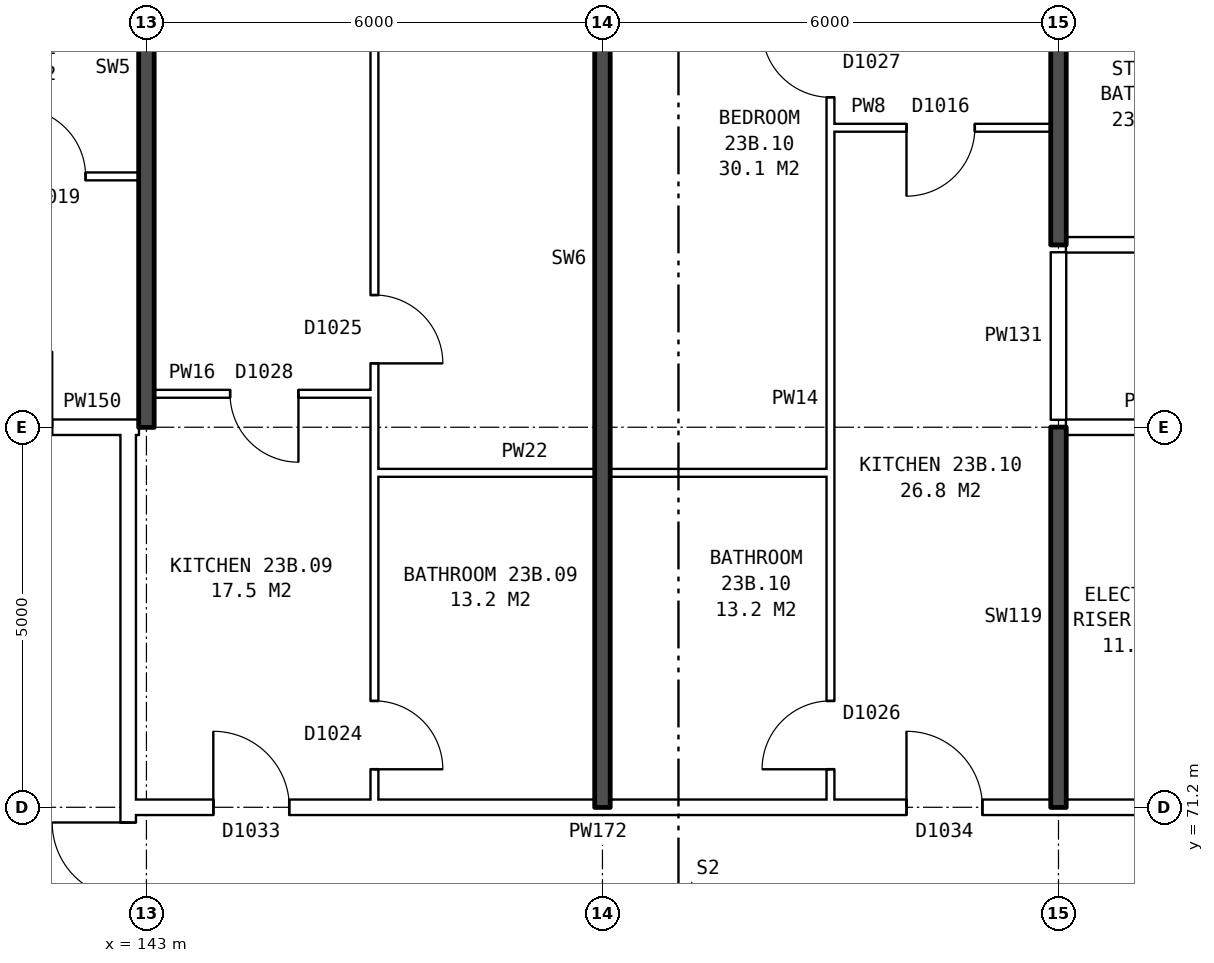
"""IFC4 building model, lengths in metres.
Left out: names, types, materials, properties, quantities, classifications, styles, units other than length and angle.
Written with IfcOpenShell. Run it as: python <this file> out.ifc"""

import sys

from ifc_helpers import new_model, si_unit, direction, frame, frame_2d, origin, place, context, subcontext, project, spatial, rectangle, extrude, element, fill, save


model = new_model("IFC4")
c1 = context("Model", 3, precision=1e-05, world=origin(), true_north=direction((0.0, 1.0)))
c2 = subcontext(c1, "Body", "Model", "MODEL_VIEW")
j1 = project(units=[si_unit("LENGTHUNIT", "METRE"), si_unit("PLANEANGLEUNIT", "RADIAN")], contexts=[c1])
p1 = place(None, origin())
s1 = spatial("IfcSite", under=j1, at=p1, CompositionType="ELEMENT")
p2 = place(p1, origin())
s2 = spatial("IfcBuilding", under=s1, at=p2, CompositionType="ELEMENT")
p3 = place(p2, frame((0.0, 0.0, 84.0)))
s3 = spatial("IfcBuildingStorey", under=s2, at=p3, CompositionType="ELEMENT", Elevation=84.0)
p4 = place(p3, frame((142.76, 63.9, 0.0), z_axis=(0.0, 0.0, 1.0), x_axis=(0.0, 1.0, 0.0)))
e1 = element("IfcWall", 1, at=p4, inside=s3, PredefinedType="PARTITIONING", context=c2, shape_type="SweptSolid", body=[
    extrude(rectangle(XDim=12.2, YDim=0.2, at=frame_2d((6.1, 0.0))), origin(), (0.0, 0.0, 1.0), 2.85),
])
p5 = place(p4, frame((5.1, 0.0, 0.0)))
e2 = element("IfcOpeningElement", 2, at=p5, cuts=e1, PredefinedType="OPENING", context=c2, shape_type="SweptSolid", body=[
    extrude(rectangle(XDim=2.0, YDim=2.1, at=frame_2d((1.0, 1.05))), frame((0.0, 0.11, 0.0), z_axis=(0.0, -1.0, 0.0), x_axis=(1.0, 0.0, 0.0)), (0.0, 0.0, 1.0), 0.22),
])
p6 = place(p3, frame((142.76, 71.2, 0.0), z_axis=(0.0, 0.0, 1.0), x_axis=(1.0, 0.0, 0.0)))
e3 = element("IfcWall", 3, at=p6, inside=s3, PredefinedType="PARTITIONING", context=c2, shape_type="SweptSolid", body=[
    extrude(rectangle(XDim=14.48, YDim=0.2, at=frame_2d((7.24, 0.0))), origin(), (0.0, 0.0, 1.0), 2.85),
])
p7 = place(p6, frame((1.12, 0.0, 0.0)))
e4 = element("IfcOpeningElement", 4, at=p7, cuts=e3, PredefinedType="OPENING", context=c2, shape_type="SweptSolid", body=[
    extrude(rectangle(XDim=1.0, YDim=2.1, at=frame_2d((0.5, 1.05))), frame((0.0, 0.11, 0.0), z_axis=(0.0, -1.0, 0.0), x_axis=(1.0, 0.0, 0.0)), (0.0, 0.0, 1.0), 0.22),
])
p8 = place(p6, frame((10.24, 0.0, 0.0)))
e5 = element("IfcOpeningElement", 5, at=p8, cuts=e3, PredefinedType="OPENING", context=c2, shape_type="SweptSolid", body=[
    extrude(rectangle(XDim=1.0, YDim=2.1, at=frame_2d((0.5, 1.05))), frame((0.0, 0.11, 0.0), z_axis=(0.0, -1.0, 0.0), x_axis=(1.0, 0.0, 0.0)), (0.0, 0.0, 1.0), 0.22),
])
p9 = place(p3, frame((146.0, 75.6, 0.0), z_axis=(0.0, 0.0, 1.0), x_axis=(1.0, 0.0, 0.0)))
e6 = element("IfcWall", 6, at=p9, inside=s3, PredefinedType="PARTITIONING", context=c2, shape_type="SweptSolid", body=[
    extrude(rectangle(XDim=6.0, YDim=0.1, at=frame_2d((3.0, 0.0))), origin(), (0.0, 0.0, 1.0), 2.85),
])
p10 = place(p3, frame((139.76, 76.2, 0.0), z_axis=(0.0, 0.0, 1.0), x_axis=(1.0, 0.0, 0.0)))
e7 = element("IfcWall", 7, at=p10, inside=s3, PredefinedType="PARTITIONING", context=c2, shape_type="SweptSolid", body=[
    extrude(rectangle(XDim=3.0, YDim=0.2, at=frame_2d((1.5, 0.0))), origin(), (0.0, 0.0, 1.0), 2.85),
])
p11 = place(p10, frame((1.0, 0.0, 0.0)))
e8 = element("IfcOpeningElement", 8, at=p11, cuts=e7, PredefinedType="OPENING", context=c2, shape_type="SweptSolid", body=[
    extrude(rectangle(XDim=1.0, YDim=2.1, at=frame_2d((0.5, 1.05))), frame((0.0, 0.11, 0.0), z_axis=(0.0, -1.0, 0.0), x_axis=(1.0, 0.0, 0.0)), (0.0, 0.0, 1.0), 0.22),
])
p12 = place(p3, frame((142.76, 76.2, 0.0), z_axis=(0.0, 0.0, 1.0), x_axis=(1.0, 0.0, 0.0)))
e9 = element("IfcWall", 9, at=p12, inside=s3, PredefinedType="PARTITIONING", context=c2, shape_type="SweptSolid", body=[
    extrude(rectangle(XDim=0.14, YDim=0.2, at=frame_2d((0.07, 0.0))), origin(), (0.0, 0.0, 1.0), 2.85),
])
p13 = place(p3, frame((155.1, 76.2, 0.0), z_axis=(0.0, 0.0, 1.0), x_axis=(1.0, 0.0, 0.0)))
e10 = element("IfcWall", 10, at=p13, inside=s3, PredefinedType="PARTITIONING", context=c2, shape_type="SweptSolid", body=[
    extrude(rectangle(XDim=2.14, YDim=0.2, at=frame_2d((1.07, 0.0))), origin(), (0.0, 0.0, 1.0), 2.85),
])
p14 = place(p3, frame((143.1, 76.64, 0.0), z_axis=(0.0, 0.0, 1.0), x_axis=(1.0, 0.0, 0.0)))
e11 = element("IfcWall", 11, at=p14, inside=s3, PredefinedType="PARTITIONING", context=c2, shape_type="SweptSolid", body=[
    extrude(rectangle(XDim=2.9, YDim=0.1, at=frame_2d((1.45, 0.0))), origin(), (0.0, 0.0, 1.0), 2.85),
])
p15 = place(p14, frame((1.0, 0.0, 0.0)))
e12 = element("IfcOpeningElement", 12, at=p15, cuts=e11, PredefinedType="OPENING", context=c2, shape_type="SweptSolid", body=[
    extrude(rectangle(XDim=0.9, YDim=2.1, at=frame_2d((0.45, 1.05))), frame((0.0, 0.06, 0.0), z_axis=(0.0, -1.0, 0.0), x_axis=(1.0, 0.0, 0.0)), (0.0, 0.0, 1.0), 0.12),
])
p16 = place(p3, frame((155.1, 78.6, 0.0), z_axis=(0.0, 0.0, 1.0), x_axis=(1.0, 0.0, 0.0)))
e13 = element("IfcWall", 13, at=p16, inside=s3, PredefinedType="PARTITIONING", context=c2, shape_type="SweptSolid", body=[
    extrude(rectangle(XDim=19.79, YDim=0.2, at=frame_2d((9.895, 0.0))), origin(), (0.0, 0.0, 1.0), 2.85),
])
p17 = place(p16, frame((3.6, 0.0, 0.0)))
e14 = element("IfcOpeningElement", 14, at=p17, cuts=e13, PredefinedType="OPENING", context=c2, shape_type="SweptSolid", body=[
    extrude(rectangle(XDim=1.0, YDim=2.1, at=frame_2d((0.5, 1.05))), frame((0.0, 0.11, 0.0), z_axis=(0.0, -1.0, 0.0), x_axis=(1.0, 0.0, 0.0)), (0.0, 0.0, 1.0), 0.22),
])
p18 = place(p16, frame((7.4, 0.0, 0.0)))
e15 = element("IfcOpeningElement", 15, at=p18, cuts=e13, PredefinedType="OPENING", context=c2, shape_type="SweptSolid", body=[
    extrude(rectangle(XDim=1.0, YDim=2.1, at=frame_2d((0.5, 1.05))), frame((0.0, 0.11, 0.0), z_axis=(0.0, -1.0, 0.0), x_axis=(1.0, 0.0, 0.0)), (0.0, 0.0, 1.0), 0.22),
])
p19 = place(p16, frame((16.545, 0.0, 0.0)))
e16 = element("IfcOpeningElement", 16, at=p19, cuts=e13, PredefinedType="OPENING", context=c2, shape_type="SweptSolid", body=[
    extrude(rectangle(XDim=1.0, YDim=2.1, at=frame_2d((0.5, 1.05))), frame((0.0, 0.11, 0.0), z_axis=(0.0, -1.0, 0.0), x_axis=(1.0, 0.0, 0.0)), (0.0, 0.0, 1.0), 0.22),
])
p20 = place(p3, frame((137.1, 79.5, 0.0), z_axis=(0.0, 0.0, 1.0), x_axis=(1.0, 0.0, 0.0)))
e17 = element("IfcWall", 17, at=p20, inside=s3, PredefinedType="PARTITIONING", context=c2, shape_type="SweptSolid", body=[
    extrude(rectangle(XDim=5.8, YDim=0.1, at=frame_2d((2.9, 0.0))), origin(), (0.0, 0.0, 1.0), 2.85),
])
p21 = place(p20, frame((1.3, 0.0, 0.0)))
e18 = element("IfcOpeningElement", 18, at=p21, cuts=e17, PredefinedType="OPENING", context=c2, shape_type="SweptSolid", body=[
    extrude(rectangle(XDim=0.9, YDim=2.1, at=frame_2d((0.45, 1.05))), frame((0.0, 0.06, 0.0), z_axis=(0.0, -1.0, 0.0), x_axis=(1.0, 0.0, 0.0)), (0.0, 0.0, 1.0), 0.12),
])
p22 = place(p20, frame((4.2, 0.0, 0.0)))
e19 = element("IfcOpeningElement", 19, at=p22, cuts=e17, PredefinedType="OPENING", context=c2, shape_type="SweptSolid", body=[
    extrude(rectangle(XDim=0.9, YDim=2.1, at=frame_2d((0.45, 1.05))), frame((0.0, 0.06, 0.0), z_axis=(0.0, -1.0, 0.0), x_axis=(1.0, 0.0, 0.0)), (0.0, 0.0, 1.0), 0.12),
])
p23 = place(p3, frame((152.0, 80.14, 0.0), z_axis=(0.0, 0.0, 1.0), x_axis=(1.0, 0.0, 0.0)))
e20 = element("IfcWall", 20, at=p23, inside=s3, PredefinedType="PARTITIONING", context=c2, shape_type="SweptSolid", body=[
    extrude(rectangle(XDim=2.9, YDim=0.1, at=frame_2d((1.45, 0.0))), origin(), (0.0, 0.0, 1.0), 2.85),
])
p24 = place(p23, frame((1.0, 0.0, 0.0)))
e21 = element("IfcOpeningElement", 21, at=p24, cuts=e20, PredefinedType="OPENING", context=c2, shape_type="SweptSolid", body=[
    extrude(rectangle(XDim=0.9, YDim=2.1, at=frame_2d((0.45, 1.05))), frame((0.0, 0.06, 0.0), z_axis=(0.0, -1.0, 0.0), x_axis=(1.0, 0.0, 0.0)), (0.0, 0.0, 1.0), 0.12),
])
p25 = place(p3, frame((143.0, 76.2, 0.0), z_axis=(0.0, 0.0, 1.0), x_axis=(0.0, 1.0, 0.0)))
e22 = element("IfcWall", 22, at=p25, inside=s3, PredefinedType="SOLIDWALL", context=c2, shape_type="SweptSolid", body=[
    extrude(rectangle(XDim=9.44, YDim=0.2, at=frame_2d((4.72, 0.0))), origin(), (0.0, 0.0, 1.0), 2.85),
])
p26 = place(p3, frame((146.0, 71.3, 0.0), z_axis=(0.0, 0.0, 1.0), x_axis=(0.0, 1.0, 0.0)))
e23 = element("IfcWall", 23, at=p26, inside=s3, PredefinedType="PARTITIONING", context=c2, shape_type="SweptSolid", body=[
    extrude(rectangle(XDim=14.34, YDim=0.1, at=frame_2d((7.17, 0.0))), origin(), (0.0, 0.0, 1.0), 2.85),
])
p27 = place(p26, frame((5.74, 0.0, 0.0)))
e24 = element("IfcOpeningElement", 24, at=p27, cuts=e23, PredefinedType="OPENING", context=c2, shape_type="SweptSolid", body=[
    extrude(rectangle(XDim=0.9, YDim=2.1, at=frame_2d((0.45, 1.05))), frame((0.0, 0.06, 0.0), z_axis=(0.0, -1.0, 0.0), x_axis=(1.0, 0.0, 0.0)), (0.0, 0.0, 1.0), 0.12),
])
p28 = place(p26, frame((0.4, 0.0, 0.0)))
e25 = element("IfcOpeningElement", 25, at=p28, cuts=e23, PredefinedType="OPENING", context=c2, shape_type="SweptSolid", body=[
    extrude(rectangle(XDim=0.9, YDim=2.1, at=frame_2d((0.45, 1.05))), frame((0.0, 0.06, 0.0), z_axis=(0.0, -1.0, 0.0), x_axis=(1.0, 0.0, 0.0)), (0.0, 0.0, 1.0), 0.12),
])
p29 = place(p3, frame((149.0, 71.2, 0.0), z_axis=(0.0, 0.0, 1.0), x_axis=(0.0, 1.0, 0.0)))
e26 = element("IfcWall", 26, at=p29, inside=s3, PredefinedType="SOLIDWALL", context=c2, shape_type="SweptSolid", body=[
    extrude(rectangle(XDim=14.44, YDim=0.2, at=frame_2d((7.22, 0.0))), origin(), (0.0, 0.0, 1.0), 2.85),
])
p30 = place(p3, frame((152.0, 71.3, 0.0), z_axis=(0.0, 0.0, 1.0), x_axis=(0.0, 1.0, 0.0)))
e27 = element("IfcWall", 27, at=p30, inside=s3, PredefinedType="PARTITIONING", context=c2, shape_type="SweptSolid", body=[
    extrude(rectangle(XDim=14.34, YDim=0.1, at=frame_2d((7.17, 0.0))), origin(), (0.0, 0.0, 1.0), 2.85),
])
p31 = place(p30, frame((9.24, 0.0, 0.0)))
e28 = element("IfcOpeningElement", 28, at=p31, cuts=e27, PredefinedType="OPENING", context=c2, shape_type="SweptSolid", body=[
    extrude(rectangle(XDim=0.9, YDim=2.1, at=frame_2d((0.45, 1.05))), frame((0.0, 0.06, 0.0), z_axis=(0.0, -1.0, 0.0), x_axis=(1.0, 0.0, 0.0)), (0.0, 0.0, 1.0), 0.12),
])
p32 = place(p30, frame((0.4, 0.0, 0.0)))
e29 = element("IfcOpeningElement", 29, at=p32, cuts=e27, PredefinedType="OPENING", context=c2, shape_type="SweptSolid", body=[
    extrude(rectangle(XDim=0.9, YDim=2.1, at=frame_2d((0.45, 1.05))), frame((0.0, 0.06, 0.0), z_axis=(0.0, -1.0, 0.0), x_axis=(1.0, 0.0, 0.0)), (0.0, 0.0, 1.0), 0.12),
])
p33 = place(p3, frame((155.0, 71.2, 0.0), z_axis=(0.0, 0.0, 1.0), x_axis=(0.0, 1.0, 0.0)))
e30 = element("IfcWall", 30, at=p33, inside=s3, PredefinedType="SOLIDWALL", context=c2, shape_type="SweptSolid", body=[
    extrude(rectangle(XDim=5.0, YDim=0.2, at=frame_2d((2.5, 0.0))), origin(), (0.0, 0.0, 1.0), 2.85),
])
p34 = place(p3, frame((155.0, 76.3, 0.0), z_axis=(0.0, 0.0, 1.0), x_axis=(0.0, 1.0, 0.0)))
e31 = element("IfcWall", 31, at=p34, inside=s3, PredefinedType="PARTITIONING", context=c2, shape_type="SweptSolid", body=[
    extrude(rectangle(XDim=2.2, YDim=0.2, at=frame_2d((1.1, 0.0))), origin(), (0.0, 0.0, 1.0), 2.85),
])
p35 = place(p3, frame((155.0, 78.6, 0.0), z_axis=(0.0, 0.0, 1.0), x_axis=(0.0, 1.0, 0.0)))
e32 = element("IfcWall", 32, at=p35, inside=s3, PredefinedType="SOLIDWALL", context=c2, shape_type="SweptSolid", body=[
    extrude(rectangle(XDim=7.04, YDim=0.2, at=frame_2d((3.52, 0.0))), origin(), (0.0, 0.0, 1.0), 2.85),
])
p36 = place(p5, origin())
e33 = element("IfcDoor", 33, at=p36, inside=s3, OperationType="DOUBLE_DOOR_SINGLE_SWING", PredefinedType="DOOR", context=c2, shape_type="SweptSolid", body=[
    extrude(rectangle(XDim=2.0, YDim=2.1, at=frame_2d((1.0, 1.05))), frame((0.0, 0.025, 0.0), z_axis=(0.0, -1.0, 0.0), x_axis=(1.0, 0.0, 0.0)), (0.0, 0.0, 1.0), 0.05),
])
fill(e2, e33)
p37 = place(p22, origin())
e34 = element("IfcDoor", 34, at=p37, inside=s3, OperationType="SINGLE_SWING_LEFT", PredefinedType="DOOR", context=c2, shape_type="SweptSolid", body=[
    extrude(rectangle(XDim=0.9, YDim=2.1, at=frame_2d((0.45, 1.05))), frame((0.0, 0.025, 0.0), z_axis=(0.0, -1.0, 0.0), x_axis=(1.0, 0.0, 0.0)), (0.0, 0.0, 1.0), 0.05),
])
fill(e19, e34)
p38 = place(p27, frame((0.9, 0.0, 0.0), z_axis=(0.0, 0.0, 1.0), x_axis=(-1.0, 0.0, 0.0)))
e35 = element("IfcDoor", 35, at=p38, inside=s3, OperationType="SINGLE_SWING_RIGHT", PredefinedType="DOOR", context=c2, shape_type="SweptSolid", body=[
    extrude(rectangle(XDim=0.9, YDim=2.1, at=frame_2d((0.45, 1.05))), frame((0.0, 0.025, 0.0), z_axis=(0.0, -1.0, 0.0), x_axis=(1.0, 0.0, 0.0)), (0.0, 0.0, 1.0), 0.05),
])
fill(e24, e35)
p39 = place(p7, origin())
e36 = element("IfcDoor", 36, at=p39, inside=s3, OperationType="SINGLE_SWING_LEFT", PredefinedType="DOOR", context=c2, shape_type="SweptSolid", body=[
    extrude(rectangle(XDim=1.0, YDim=2.1, at=frame_2d((0.5, 1.05))), frame((0.0, 0.025, 0.0), z_axis=(0.0, -1.0, 0.0), x_axis=(1.0, 0.0, 0.0)), (0.0, 0.0, 1.0), 0.05),
])
fill(e4, e36)
p40 = place(p15, frame((0.9, 0.0, 0.0), z_axis=(0.0, 0.0, 1.0), x_axis=(-1.0, 0.0, 0.0)))
e37 = element("IfcDoor", 37, at=p40, inside=s3, OperationType="SINGLE_SWING_LEFT", PredefinedType="DOOR", context=c2, shape_type="SweptSolid", body=[
    extrude(rectangle(XDim=0.9, YDim=2.1, at=frame_2d((0.45, 1.05))), frame((0.0, 0.025, 0.0), z_axis=(0.0, -1.0, 0.0), x_axis=(1.0, 0.0, 0.0)), (0.0, 0.0, 1.0), 0.05),
])
fill(e12, e37)
p41 = place(p28, frame((0.9, 0.0, 0.0), z_axis=(0.0, 0.0, 1.0), x_axis=(-1.0, 0.0, 0.0)))
e38 = element("IfcDoor", 38, at=p41, inside=s3, OperationType="SINGLE_SWING_RIGHT", PredefinedType="DOOR", context=c2, shape_type="SweptSolid", body=[
    extrude(rectangle(XDim=0.9, YDim=2.1, at=frame_2d((0.45, 1.05))), frame((0.0, 0.025, 0.0), z_axis=(0.0, -1.0, 0.0), x_axis=(1.0, 0.0, 0.0)), (0.0, 0.0, 1.0), 0.05),
])
fill(e25, e38)
p42 = place(p31, origin())
e39 = element("IfcDoor", 39, at=p42, inside=s3, OperationType="SINGLE_SWING_RIGHT", PredefinedType="DOOR", context=c2, shape_type="SweptSolid", body=[
    extrude(rectangle(XDim=0.9, YDim=2.1, at=frame_2d((0.45, 1.05))), frame((0.0, 0.025, 0.0), z_axis=(0.0, -1.0, 0.0), x_axis=(1.0, 0.0, 0.0)), (0.0, 0.0, 1.0), 0.05),
])
fill(e28, e39)
p43 = place(p8, origin())
e40 = element("IfcDoor", 40, at=p43, inside=s3, OperationType="SINGLE_SWING_LEFT", PredefinedType="DOOR", context=c2, shape_type="SweptSolid", body=[
    extrude(rectangle(XDim=1.0, YDim=2.1, at=frame_2d((0.5, 1.05))), frame((0.0, 0.025, 0.0), z_axis=(0.0, -1.0, 0.0), x_axis=(1.0, 0.0, 0.0)), (0.0, 0.0, 1.0), 0.05),
])
fill(e5, e40)
p44 = place(p24, frame((0.9, 0.0, 0.0), z_axis=(0.0, 0.0, 1.0), x_axis=(-1.0, 0.0, 0.0)))
e41 = element("IfcDoor", 41, at=p44, inside=s3, OperationType="SINGLE_SWING_RIGHT", PredefinedType="DOOR", context=c2, shape_type="SweptSolid", body=[
    extrude(rectangle(XDim=0.9, YDim=2.1, at=frame_2d((0.45, 1.05))), frame((0.0, 0.025, 0.0), z_axis=(0.0, -1.0, 0.0), x_axis=(1.0, 0.0, 0.0)), (0.0, 0.0, 1.0), 0.05),
])
fill(e21, e41)
p45 = place(p32, origin())
e42 = element("IfcDoor", 42, at=p45, inside=s3, OperationType="SINGLE_SWING_LEFT", PredefinedType="DOOR", context=c2, shape_type="SweptSolid", body=[
    extrude(rectangle(XDim=0.9, YDim=2.1, at=frame_2d((0.45, 1.05))), frame((0.0, 0.025, 0.0), z_axis=(0.0, -1.0, 0.0), x_axis=(1.0, 0.0, 0.0)), (0.0, 0.0, 1.0), 0.05),
])
fill(e29, e42)
save(model, sys.argv[1])
